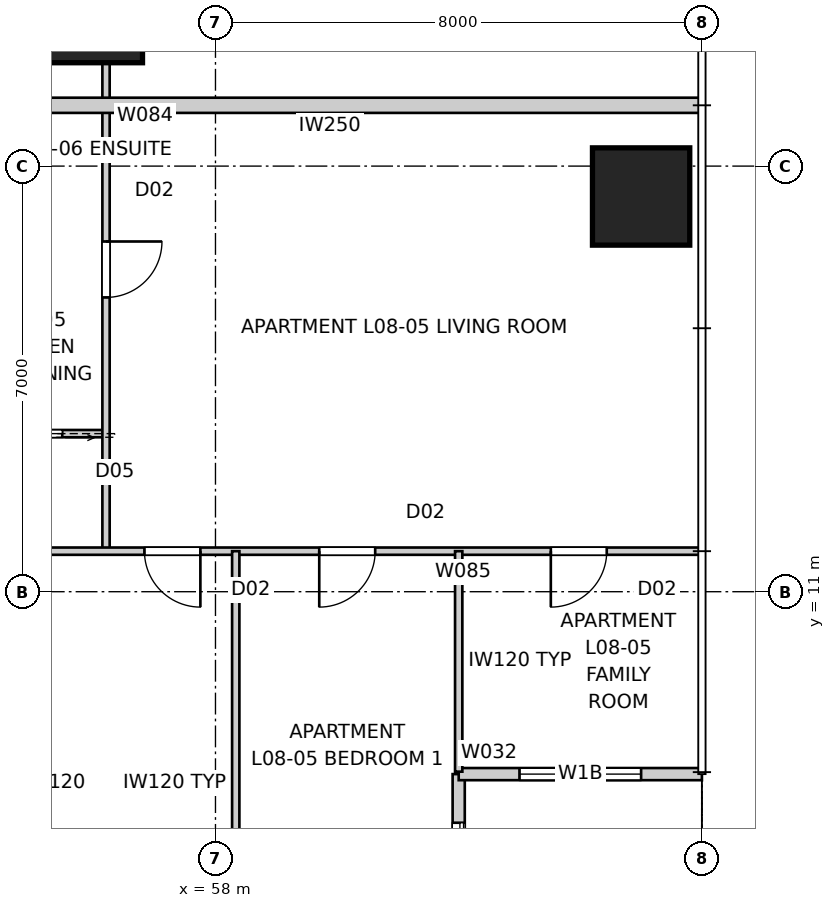
"""IFC4 building model, lengths in metres.
Left out: names, types, materials, properties, quantities, classifications, styles, units other than length and angle.
Written with IfcOpenShell. Run it as: python <this file> out.ifc"""

import sys

from ifc_helpers import new_model, si_unit, direction, frame, frame_2d, origin, origin_2d, place, context, subcontext, project, spatial, rectangle, extrude, element, fill, save


model = new_model("IFC4")
c1 = context("Model", 3, precision=1e-05, world=origin(), true_north=direction((0.0, 1.0)))
c2 = subcontext(c1, "Body", "Model", "MODEL_VIEW")
j1 = project(units=[si_unit("LENGTHUNIT", "METRE"), si_unit("PLANEANGLEUNIT", "RADIAN")], contexts=[c1])
p1 = place(None, origin())
s1 = spatial("IfcSite", under=j1, at=p1, CompositionType="ELEMENT")
p2 = place(p1, origin())
s2 = spatial("IfcBuilding", under=s1, at=p2, CompositionType="ELEMENT")
p3 = place(p2, frame((0.0, 0.0, 32.0)))
s3 = spatial("IfcBuildingStorey", under=s2, at=p3, CompositionType="ELEMENT", Elevation=32.0)
for number, where, z_axis, x_axis in (
    (1, (65.0, 17.5, 0.0), (0.0, 0.0, 1.0), (1.0, 0.0, 0.0)),
    (2, (56.0, 20.5, 0.0), (0.0, 0.0, 1.0), (1.0, 0.0, 0.0)),
):
    element("IfcColumn", number, at=place(p3, frame(where, z_axis=z_axis, x_axis=x_axis)), inside=s3, PredefinedType="COLUMN", context=c2, shape_type="SweptSolid", body=[
        extrude(rectangle(XDim=1.6, YDim=1.6, at=origin_2d()), origin(), (0.0, 0.0, 1.0), 3.4),
    ])
p4 = place(p3, frame((62.0, 4.0, 0.0), z_axis=(0.0, 0.0, 1.0), x_axis=(0.0, 1.0, 0.0)))
e3 = element("IfcWall", 3, at=p4, inside=s3, PredefinedType="SOLIDWALL", context=c2, shape_type="SweptSolid", body=[
    extrude(rectangle(XDim=4.0, YDim=0.2, at=frame_2d((2.0, 0.0))), origin(), (0.0, 0.0, 1.0), 3.25),
])
p5 = place(p4, frame((0.8, 0.0, 0.0)))
e4 = element("IfcOpeningElement", 4, at=p5, cuts=e3, PredefinedType="OPENING", context=c2, shape_type="SweptSolid", body=[
    extrude(rectangle(XDim=2.4, YDim=2.1, at=frame_2d((1.2, 1.05))), frame((0.0, 0.11, 0.0), z_axis=(0.0, -1.0, 0.0), x_axis=(1.0, 0.0, 0.0)), (0.0, 0.0, 1.0), 0.22),
])
p6 = place(p3, frame((62.0, 8.0, 0.0), z_axis=(0.0, 0.0, 1.0), x_axis=(1.0, 0.0, 0.0)))
e5 = element("IfcWall", 5, at=p6, inside=s3, PredefinedType="SOLIDWALL", context=c2, shape_type="SweptSolid", body=[
    extrude(rectangle(XDim=4.0, YDim=0.2, at=frame_2d((2.0, 0.0))), origin(), (0.0, 0.0, 1.0), 3.25),
])
p7 = place(p6, frame((1.0, 0.0, 0.45)))
e6 = element("IfcOpeningElement", 6, at=p7, cuts=e5, PredefinedType="OPENING", context=c2, shape_type="SweptSolid", body=[
    extrude(rectangle(XDim=2.0, YDim=1.8, at=frame_2d((1.0, 0.9))), frame((0.0, 0.11, 0.0), z_axis=(0.0, -1.0, 0.0), x_axis=(1.0, 0.0, 0.0)), (0.0, 0.0, 1.0), 0.22),
])
p8 = place(p3, frame((66.0, 19.0, 0.0), z_axis=(0.0, 0.0, 1.0), x_axis=(-1.0, 0.0, 0.0)))
e7 = element("IfcWall", 7, at=p8, inside=s3, PredefinedType="PARTITIONING", context=c2, shape_type="SweptSolid", body=[
    extrude(rectangle(XDim=12.24, YDim=0.25, at=frame_2d((6.12, 0.0))), origin(), (0.0, 0.0, 1.0), 3.25),
])
p9 = place(p3, frame((56.2, 13.6, 0.0), z_axis=(0.0, 0.0, 1.0), x_axis=(-1.0, 0.0, 0.0)))
e8 = element("IfcWall", 8, at=p9, inside=s3, PredefinedType="PARTITIONING", context=c2, shape_type="SweptSolid", body=[
    extrude(rectangle(XDim=2.5, YDim=0.12, at=frame_2d((1.25, 0.0))), origin(), (0.0, 0.0, 1.0), 3.25),
])
p10 = place(p9, frame((0.72, 0.0, 0.0)))
e9 = element("IfcOpeningElement", 9, at=p10, cuts=e8, PredefinedType="OPENING", context=c2, shape_type="SweptSolid", body=[
    extrude(rectangle(XDim=0.96, YDim=2.1, at=frame_2d((0.48, 1.05))), frame((0.0, 0.07, 0.0), z_axis=(0.0, -1.0, 0.0), x_axis=(1.0, 0.0, 0.0)), (0.0, 0.0, 1.0), 0.14),
])
p11 = place(p3, frame((56.2, 48.333, 0.0), z_axis=(0.0, 0.0, 1.0), x_axis=(0.0, -1.0, 0.0)))
e10 = element("IfcWall", 10, at=p11, inside=s3, PredefinedType="PARTITIONING", context=c2, shape_type="SweptSolid", body=[
    extrude(rectangle(XDim=36.667, YDim=0.12, at=frame_2d((18.333, 0.0))), origin(), (0.0, 0.0, 1.0), 2.55),
])
p12 = place(p11, frame((31.573, 0.0, 0.0)))
e11 = element("IfcOpeningElement", 11, at=p12, cuts=e10, PredefinedType="OPENING", context=c2, shape_type="SweptSolid", body=[
    extrude(rectangle(XDim=0.92, YDim=2.34, at=frame_2d((0.46, 1.17))), frame((0.0, 0.07, 0.0), z_axis=(0.0, -1.0, 0.0), x_axis=(1.0, 0.0, 0.0)), (0.0, 0.0, 1.0), 0.14),
])
p13 = place(p11, frame((3.207, 0.0, 0.0)))
e12 = element("IfcOpeningElement", 12, at=p13, cuts=e10, PredefinedType="OPENING", context=c2, shape_type="SweptSolid", body=[
    extrude(rectangle(XDim=0.92, YDim=2.34, at=frame_2d((0.46, 1.17))), frame((0.0, 0.07, 0.0), z_axis=(0.0, -1.0, 0.0), x_axis=(1.0, 0.0, 0.0)), (0.0, 0.0, 1.0), 0.14),
])
p14 = place(p11, frame((12.542, 0.0, 0.0)))
e13 = element("IfcOpeningElement", 13, at=p14, cuts=e10, PredefinedType="OPENING", context=c2, shape_type="SweptSolid", body=[
    extrude(rectangle(XDim=0.92, YDim=2.34, at=frame_2d((0.46, 1.17))), frame((0.0, 0.07, 0.0), z_axis=(0.0, -1.0, 0.0), x_axis=(1.0, 0.0, 0.0)), (0.0, 0.0, 1.0), 0.14),
])
p15 = place(p11, frame((19.732, 0.0, 0.0)))
e14 = element("IfcOpeningElement", 14, at=p15, cuts=e10, PredefinedType="OPENING", context=c2, shape_type="SweptSolid", body=[
    extrude(rectangle(XDim=0.92, YDim=2.34, at=frame_2d((0.46, 1.17))), frame((0.0, 0.07, 0.0), z_axis=(0.0, -1.0, 0.0), x_axis=(1.0, 0.0, 0.0)), (0.0, 0.0, 1.0), 0.14),
])
p16 = place(p11, frame((9.762, 0.0, 0.0)))
e15 = element("IfcOpeningElement", 15, at=p16, cuts=e10, PredefinedType="OPENING", context=c2, shape_type="SweptSolid", body=[
    extrude(rectangle(XDim=0.96, YDim=2.1, at=frame_2d((0.48, 1.05))), frame((0.0, 0.07, 0.0), z_axis=(0.0, -1.0, 0.0), x_axis=(1.0, 0.0, 0.0)), (0.0, 0.0, 1.0), 0.14),
])
p17 = place(p11, frame((16.52, 0.0, 0.0)))
e16 = element("IfcOpeningElement", 16, at=p17, cuts=e10, PredefinedType="OPENING", context=c2, shape_type="SweptSolid", body=[
    extrude(rectangle(XDim=0.96, YDim=2.1, at=frame_2d((0.48, 1.05))), frame((0.0, 0.07, 0.0), z_axis=(0.0, -1.0, 0.0), x_axis=(1.0, 0.0, 0.0)), (0.0, 0.0, 1.0), 0.14),
])
p18 = place(p11, frame((23.709, 0.0, 0.0)))
e17 = element("IfcOpeningElement", 17, at=p18, cuts=e10, PredefinedType="OPENING", context=c2, shape_type="SweptSolid", body=[
    extrude(rectangle(XDim=0.96, YDim=2.1, at=frame_2d((0.48, 1.05))), frame((0.0, 0.07, 0.0), z_axis=(0.0, -1.0, 0.0), x_axis=(1.0, 0.0, 0.0)), (0.0, 0.0, 1.0), 0.14),
])
p19 = place(p3, frame((65.96, 11.667, 0.0), z_axis=(0.0, 0.0, 1.0), x_axis=(-1.0, 0.0, 0.0)))
e18 = element("IfcWall", 18, at=p19, inside=s3, PredefinedType="PARTITIONING", context=c2, shape_type="SweptSolid", body=[
    extrude(rectangle(XDim=11.293, YDim=0.12, at=frame_2d((5.646, 0.0))), origin(), (0.0, 0.0, 1.0), 3.25),
])
p20 = place(p19, frame((1.525, 0.0, 0.0)))
e19 = element("IfcOpeningElement", 19, at=p20, cuts=e18, PredefinedType="OPENING", context=c2, shape_type="SweptSolid", body=[
    extrude(rectangle(XDim=0.92, YDim=2.34, at=frame_2d((0.46, 1.17))), frame((0.0, 0.07, 0.0), z_axis=(0.0, -1.0, 0.0), x_axis=(1.0, 0.0, 0.0)), (0.0, 0.0, 1.0), 0.14),
])
p21 = place(p19, frame((5.333, 0.0, 0.0)))
e20 = element("IfcOpeningElement", 20, at=p21, cuts=e18, PredefinedType="OPENING", context=c2, shape_type="SweptSolid", body=[
    extrude(rectangle(XDim=0.92, YDim=2.34, at=frame_2d((0.46, 1.17))), frame((0.0, 0.07, 0.0), z_axis=(0.0, -1.0, 0.0), x_axis=(1.0, 0.0, 0.0)), (0.0, 0.0, 1.0), 0.14),
])
p22 = place(p19, frame((8.208, 0.0, 0.0)))
e21 = element("IfcOpeningElement", 21, at=p22, cuts=e18, PredefinedType="OPENING", context=c2, shape_type="SweptSolid", body=[
    extrude(rectangle(XDim=0.92, YDim=2.34, at=frame_2d((0.46, 1.17))), frame((0.0, 0.07, 0.0), z_axis=(0.0, -1.0, 0.0), x_axis=(1.0, 0.0, 0.0)), (0.0, 0.0, 1.0), 0.14),
])
p23 = place(p3, frame((58.333, 4.04, 0.0), z_axis=(0.0, 0.0, 1.0), x_axis=(0.0, 1.0, 0.0)))
e22 = element("IfcWall", 22, at=p23, inside=s3, PredefinedType="PARTITIONING", context=c2, shape_type="SweptSolid", body=[
    extrude(rectangle(XDim=7.627, YDim=0.12, at=frame_2d((3.813, 0.0))), origin(), (0.0, 0.0, 1.0), 3.25),
])
p24 = place(p3, frame((62.0, 11.667, 0.0), z_axis=(0.0, 0.0, 1.0), x_axis=(0.0, -1.0, 0.0)))
e23 = element("IfcWall", 23, at=p24, inside=s3, PredefinedType="PARTITIONING", context=c2, shape_type="SweptSolid", body=[
    extrude(rectangle(XDim=3.627, YDim=0.12, at=frame_2d((1.813, 0.0))), origin(), (0.0, 0.0, 1.0), 3.25),
])
p25 = place(p5, origin())
e24 = element("IfcDoor", 24, at=p25, inside=s3, OperationType="SLIDING_TO_LEFT", PredefinedType="DOOR", context=c2, shape_type="SweptSolid", body=[
    extrude(rectangle(XDim=2.4, YDim=2.1, at=frame_2d((1.2, 1.05))), frame((0.0, 0.025, 0.0), z_axis=(0.0, -1.0, 0.0), x_axis=(1.0, 0.0, 0.0)), (0.0, 0.0, 1.0), 0.05),
])
fill(e4, e24)
p26 = place(p7, origin())
e25 = element("IfcWindow", 25, at=p26, inside=s3, PartitioningType="SINGLE_PANEL", PredefinedType="WINDOW", context=c2, shape_type="SweptSolid", body=[
    extrude(rectangle(XDim=2.0, YDim=1.8, at=frame_2d((1.0, 0.9))), frame((0.0, 0.03, 0.0), z_axis=(0.0, -1.0, 0.0), x_axis=(1.0, 0.0, 0.0)), (0.0, 0.0, 1.0), 0.06),
])
fill(e6, e25)
p27 = place(p12, origin())
e26 = element("IfcDoor", 26, at=p27, inside=s3, OperationType="SINGLE_SWING_LEFT", PredefinedType="DOOR", context=c2, shape_type="SweptSolid", body=[
    extrude(rectangle(XDim=0.92, YDim=2.34, at=frame_2d((0.46, 1.17))), frame((0.0, 0.025, 0.0), z_axis=(0.0, -1.0, 0.0), x_axis=(1.0, 0.0, 0.0)), (0.0, 0.0, 1.0), 0.05),
])
fill(e11, e26)
p28 = place(p10, origin())
e27 = element("IfcDoor", 27, at=p28, inside=s3, OperationType="SLIDING_TO_LEFT", PredefinedType="DOOR", context=c2, shape_type="SweptSolid", body=[
    extrude(rectangle(XDim=0.96, YDim=2.1, at=frame_2d((0.48, 1.05))), frame((0.0, 0.025, 0.0), z_axis=(0.0, -1.0, 0.0), x_axis=(1.0, 0.0, 0.0)), (0.0, 0.0, 1.0), 0.05),
])
fill(e9, e27)
p29 = place(p20, origin())
e28 = element("IfcDoor", 28, at=p29, inside=s3, OperationType="SINGLE_SWING_RIGHT", PredefinedType="DOOR", context=c2, shape_type="SweptSolid", body=[
    extrude(rectangle(XDim=0.92, YDim=2.34, at=frame_2d((0.46, 1.17))), frame((0.0, 0.025, 0.0), z_axis=(0.0, -1.0, 0.0), x_axis=(1.0, 0.0, 0.0)), (0.0, 0.0, 1.0), 0.05),
])
fill(e19, e28)
p30 = place(p21, origin())
e29 = element("IfcDoor", 29, at=p30, inside=s3, OperationType="SINGLE_SWING_RIGHT", PredefinedType="DOOR", context=c2, shape_type="SweptSolid", body=[
    extrude(rectangle(XDim=0.92, YDim=2.34, at=frame_2d((0.46, 1.17))), frame((0.0, 0.025, 0.0), z_axis=(0.0, -1.0, 0.0), x_axis=(1.0, 0.0, 0.0)), (0.0, 0.0, 1.0), 0.05),
])
fill(e20, e29)
p31 = place(p22, origin())
e30 = element("IfcDoor", 30, at=p31, inside=s3, OperationType="SINGLE_SWING_LEFT", PredefinedType="DOOR", context=c2, shape_type="SweptSolid", body=[
    extrude(rectangle(XDim=0.92, YDim=2.34, at=frame_2d((0.46, 1.17))), frame((0.0, 0.025, 0.0), z_axis=(0.0, -1.0, 0.0), x_axis=(1.0, 0.0, 0.0)), (0.0, 0.0, 1.0), 0.05),
])
fill(e21, e30)
save(model, sys.argv[1])
